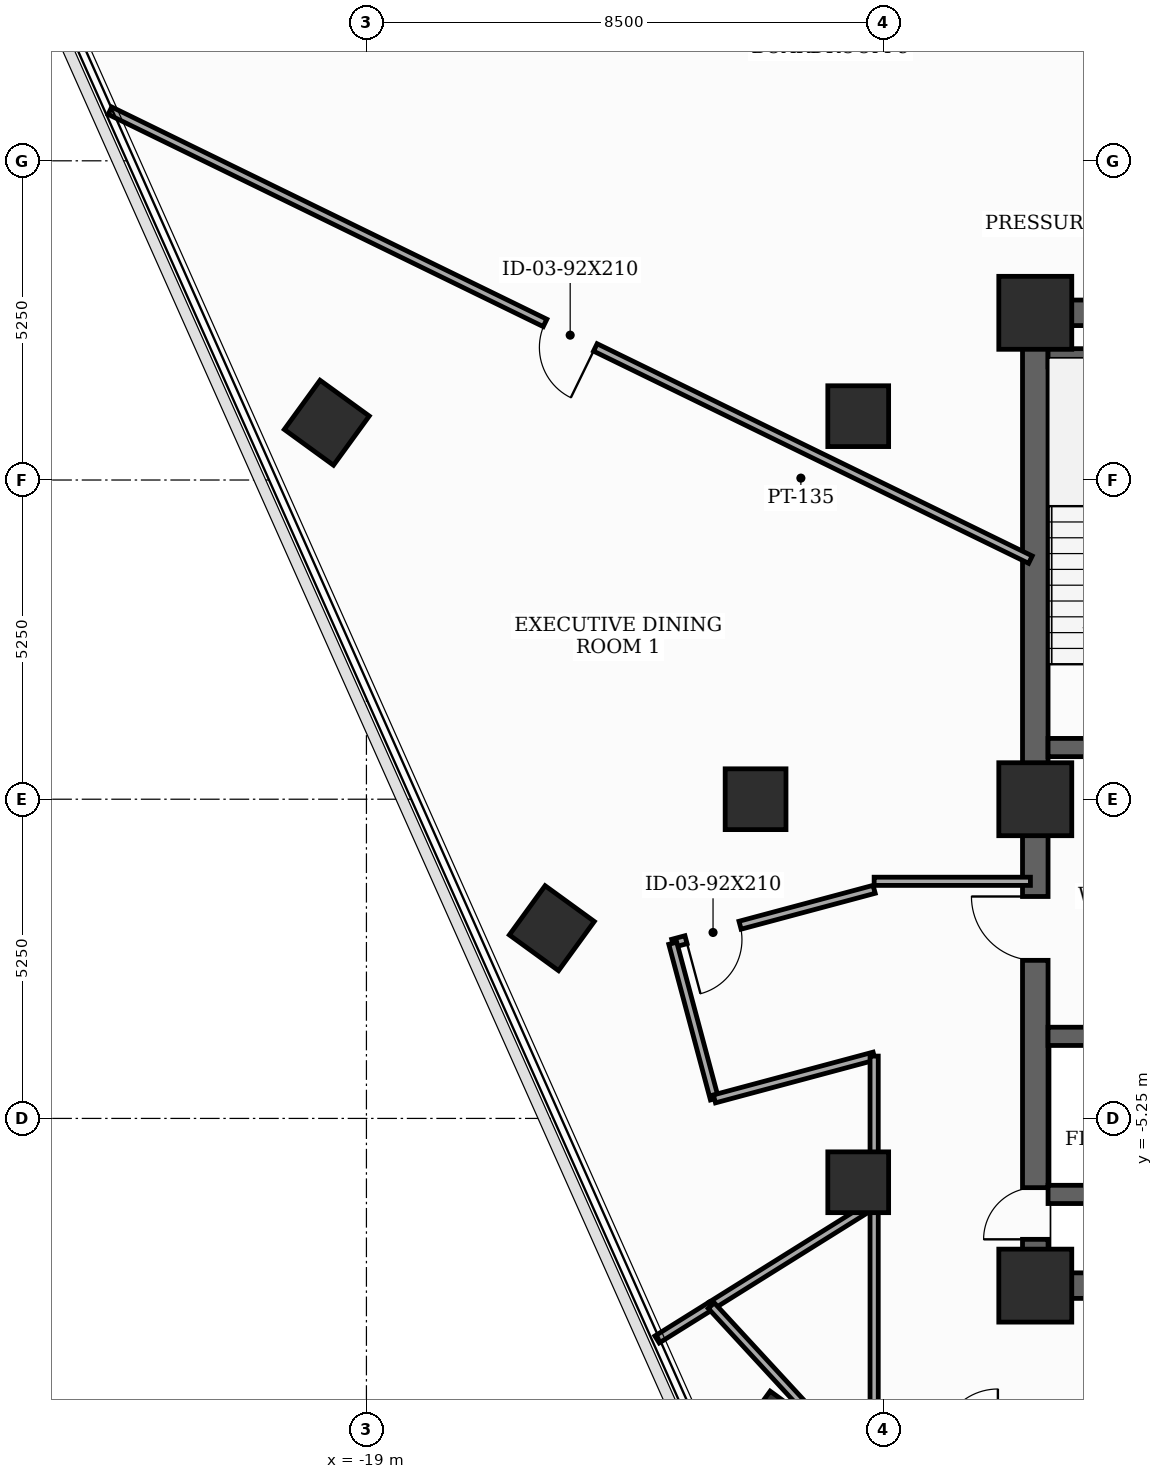
"""IFC4 building model, lengths in metres.
Left out: names, types, materials, properties, quantities, classifications, styles, units other than length and angle.
Written with IfcOpenShell. Run it as: python <this file> out.ifc"""

import sys

from ifc_helpers import new_model, si_unit, direction, frame, frame_2d, origin, origin_2d, place, context, subcontext, project, spatial, rectangle, extrude, element, fill, save


model = new_model("IFC4")
c1 = context("Model", 3, precision=1e-05, world=origin(), true_north=direction((0.0, 1.0)))
c2 = subcontext(c1, "Body", "Model", "MODEL_VIEW")
j1 = project(units=[si_unit("LENGTHUNIT", "METRE"), si_unit("PLANEANGLEUNIT", "RADIAN")], contexts=[c1])
p1 = place(None, origin())
s1 = spatial("IfcSite", under=j1, at=p1, CompositionType="ELEMENT")
p2 = place(p1, origin())
s2 = spatial("IfcBuilding", under=s1, at=p2, CompositionType="ELEMENT")
p3 = place(p2, frame((0.0, 0.0, 218.9)))
s3 = spatial("IfcBuildingStorey", under=s2, at=p3, CompositionType="ELEMENT", Elevation=218.9)
for number, where, z_axis, x_axis in (
    (1, (-8.0, -8.0, 0.0), (0.0, 0.0, 1.0), (1.0, 0.0, 0.0)),
    (2, (-8.0, 8.0, 0.0), (0.0, 0.0, 1.0), (1.0, 0.0, 0.0)),
    (3, (-8.0, 0.0, 0.0), (0.0, 0.0, 1.0), (1.0, 0.0, 0.0)),
):
    element("IfcColumn", number, at=place(p3, frame(where, z_axis=z_axis, x_axis=x_axis)), inside=s3, PredefinedType="COLUMN", context=c2, shape_type="SweptSolid", body=[
        extrude(rectangle(XDim=1.2, YDim=1.2, at=origin_2d()), origin(), (0.0, 0.0, 1.0), 3.7),
    ])
for number, where, z_axis, x_axis in (
    (4, (-10.912, 6.3, 0.0), (0.0, 0.0, 1.0), (1.0, 0.0, 0.0)),
    (5, (-12.6, 0.0, 0.0), (0.0, 0.0, 1.0), (1.0, 0.0, 0.0)),
    (6, (-10.912, -6.3, 0.0), (0.0, 0.0, 1.0), (1.0, 0.0, 0.0)),
    (7, (-19.652, 6.192, 0.0), (0.0, 0.0, 1.0), (0.588, 0.809, 0.0)),
    (8, (-15.951, -2.121, 0.0), (0.0, 0.0, 1.0), (0.588, 0.809, 0.0)),
    (9, (-12.25, -10.435, 0.0), (0.0, 0.0, 1.0), (0.588, 0.809, 0.0)),
):
    element("IfcColumn", number, at=place(p3, frame(where, z_axis=z_axis, x_axis=x_axis)), inside=s3, PredefinedType="COLUMN", context=c2, shape_type="SweptSolid", body=[
        extrude(rectangle(XDim=1.0, YDim=1.0, at=origin_2d()), origin(), (0.0, 0.0, 1.0), 3.7),
    ])
p4 = place(p3, frame((-8.0, -8.0, 0.0), z_axis=(0.0, 0.0, 1.0), x_axis=(0.0, 1.0, 0.0)))
e10 = element("IfcWall", 10, at=p4, inside=s3, PredefinedType="SHEAR", context=c2, shape_type="SweptSolid", body=[
    extrude(rectangle(XDim=16.0, YDim=0.42, at=frame_2d((8.0, 0.0))), origin(), (0.0, 0.0, 1.0), 3.5),
])
p5 = place(p4, frame((0.761, 0.0, 0.0)))
e11 = element("IfcOpeningElement", 11, at=p5, cuts=e10, PredefinedType="OPENING", context=c2, shape_type="SweptSolid", body=[
    extrude(rectangle(XDim=0.85, YDim=2.02, at=frame_2d((0.425, 1.01))), frame((0.0, 0.22, 0.0), z_axis=(0.0, -1.0, 0.0), x_axis=(1.0, 0.0, 0.0)), (0.0, 0.0, 1.0), 0.44),
])
p6 = place(p4, frame((5.35, 0.0, 0.0)))
e12 = element("IfcOpeningElement", 12, at=p6, cuts=e10, PredefinedType="OPENING", context=c2, shape_type="SweptSolid", body=[
    extrude(rectangle(XDim=1.05, YDim=2.15, at=frame_2d((0.525, 1.075))), frame((0.0, 0.22, 0.0), z_axis=(0.0, -1.0, 0.0), x_axis=(1.0, 0.0, 0.0)), (0.0, 0.0, 1.0), 0.44),
])
p7 = place(p3, frame((-8.0, -8.0, 0.0), z_axis=(0.0, 0.0, 1.0), x_axis=(1.0, 0.0, 0.0)))
e13 = element("IfcWall", 13, at=p7, inside=s3, PredefinedType="SHEAR", context=c2, shape_type="SweptSolid", body=[
    extrude(rectangle(XDim=16.0, YDim=0.42, at=frame_2d((8.0, 0.0))), origin(), (0.0, 0.0, 1.0), 3.5),
])
p8 = place(p7, frame((7.52, 0.0, 0.0)))
e14 = element("IfcOpeningElement", 14, at=p8, cuts=e13, PredefinedType="OPENING", context=c2, shape_type="SweptSolid", body=[
    extrude(rectangle(XDim=0.95, YDim=2.1, at=frame_2d((0.475, 1.05))), frame((0.0, 0.22, 0.0), z_axis=(0.0, -1.0, 0.0), x_axis=(1.0, 0.0, 0.0)), (0.0, 0.0, 1.0), 0.44),
])
p9 = place(p3, frame((-8.0, 8.0, 0.0), z_axis=(0.0, 0.0, 1.0), x_axis=(1.0, 0.0, 0.0)))
e15 = element("IfcWall", 15, at=p9, inside=s3, PredefinedType="SHEAR", context=c2, shape_type="SweptSolid", body=[
    extrude(rectangle(XDim=16.0, YDim=0.42, at=frame_2d((8.0, 0.0))), origin(), (0.0, 0.0, 1.0), 3.5),
])
p10 = place(p9, frame((7.1, 0.0, 0.0)))
e16 = element("IfcOpeningElement", 16, at=p10, cuts=e15, PredefinedType="OPENING", context=c2, shape_type="SweptSolid", body=[
    extrude(rectangle(XDim=1.8, YDim=2.15, at=frame_2d((0.9, 1.075))), frame((0.0, 0.22, 0.0), z_axis=(0.0, -1.0, 0.0), x_axis=(1.0, 0.0, 0.0)), (0.0, 0.0, 1.0), 0.44),
])
p11 = place(p3, frame((-7.79, 0.85, 0.0), z_axis=(0.0, 0.0, 1.0), x_axis=(1.0, 0.0, 0.0)))
e17 = element("IfcWall", 17, at=p11, inside=s3, PredefinedType="SHEAR", context=c2, shape_type="SweptSolid", body=[
    extrude(rectangle(XDim=3.34, YDim=0.3, at=frame_2d((1.67, 0.0))), origin(), (0.0, 0.0, 1.0), 3.5),
])
p12 = place(p11, frame((1.85, 0.0, 0.0)))
e18 = element("IfcOpeningElement", 18, at=p12, cuts=e17, PredefinedType="OPENING", context=c2, shape_type="SweptSolid", body=[
    extrude(rectangle(XDim=1.05, YDim=2.15, at=frame_2d((0.525, 1.075))), frame((0.0, 0.16, 0.0), z_axis=(0.0, -1.0, 0.0), x_axis=(1.0, 0.0, 0.0)), (0.0, 0.0, 1.0), 0.32),
])
p13 = place(p3, frame((-7.79, 7.26, 0.0), z_axis=(0.0, 0.0, 1.0), x_axis=(1.0, 0.0, 0.0)))
e19 = element("IfcWall", 19, at=p13, inside=s3, PredefinedType="SHEAR", context=c2, shape_type="SweptSolid", body=[
    extrude(rectangle(XDim=3.34, YDim=0.3, at=frame_2d((1.67, 0.0))), origin(), (0.0, 0.0, 1.0), 3.5),
])
p14 = place(p3, frame((-7.79, -3.9, 0.0), z_axis=(0.0, 0.0, 1.0), x_axis=(1.0, 0.0, 0.0)))
e20 = element("IfcWall", 20, at=p14, inside=s3, PredefinedType="SHEAR", context=c2, shape_type="SweptSolid", body=[
    extrude(rectangle(XDim=3.34, YDim=0.3, at=frame_2d((1.67, 0.0))), origin(), (0.0, 0.0, 1.0), 3.5),
])
p15 = place(p14, frame((1.27, 0.0, 0.0)))
e21 = element("IfcOpeningElement", 21, at=p15, cuts=e20, PredefinedType="OPENING", context=c2, shape_type="SweptSolid", body=[
    extrude(rectangle(XDim=1.1, YDim=2.1, at=frame_2d((0.55, 1.05))), frame((0.0, 0.16, 0.0), z_axis=(0.0, -1.0, 0.0), x_axis=(1.0, 0.0, 0.0)), (0.0, 0.0, 1.0), 0.32),
])
p16 = place(p3, frame((-7.79, -6.5, 0.0), z_axis=(0.0, 0.0, 1.0), x_axis=(1.0, 0.0, 0.0)))
e22 = element("IfcWall", 22, at=p16, inside=s3, PredefinedType="SHEAR", context=c2, shape_type="SweptSolid", body=[
    extrude(rectangle(XDim=3.34, YDim=0.3, at=frame_2d((1.67, 0.0))), origin(), (0.0, 0.0, 1.0), 3.5),
])
p17 = place(p3, frame((-8.08, -1.35, 0.0), z_axis=(0.0, 0.0, 1.0), x_axis=(-1.0, 0.0, 0.0)))
e23 = element("IfcWall", 23, at=p17, inside=s3, PredefinedType="PARTITIONING", context=c2, shape_type="SweptSolid", body=[
    extrude(rectangle(XDim=2.57, YDim=0.135, at=frame_2d((1.285, 0.0))), origin(), (0.0, 0.0, 1.0), 2.885),
])
p18 = place(p3, frame((-10.65, -1.482, 0.0), z_axis=(0.0, 0.0, 1.0), x_axis=(-0.965961397105, -0.2586862565, 0.0)))
e24 = element("IfcWall", 24, at=p18, inside=s3, PredefinedType="PARTITIONING", context=c2, shape_type="SweptSolid", body=[
    extrude(rectangle(XDim=3.429, YDim=0.135, at=frame_2d((1.714, 0.0))), origin(), (0.0, 0.0, 1.0), 2.885),
])
p19 = place(p18, frame((2.283, 0.0, 0.0)))
e25 = element("IfcOpeningElement", 25, at=p19, cuts=e24, PredefinedType="OPENING", context=c2, shape_type="SweptSolid", body=[
    extrude(rectangle(XDim=0.92, YDim=2.1, at=frame_2d((0.46, 1.05))), frame((0.0, 0.077, 0.0), z_axis=(0.0, -1.0, 0.0), x_axis=(1.0, 0.0, 0.0)), (0.0, 0.0, 1.0), 0.155),
])
p20 = place(p3, frame((-13.962, -2.369, 0.0), z_axis=(0.0, 0.0, 1.0), x_axis=(0.258413725385, -0.966034340245, 0.0)))
e26 = element("IfcWall", 26, at=p20, inside=s3, PredefinedType="PARTITIONING", context=c2, shape_type="SweptSolid", body=[
    extrude(rectangle(XDim=2.65, YDim=0.135, at=frame_2d((1.325, 0.0))), origin(), (0.0, 0.0, 1.0), 3.5),
])
p21 = place(p3, frame((-13.277, -4.929, 0.0), z_axis=(0.0, 0.0, 1.0), x_axis=(0.965934830229, 0.258785439601, 0.0)))
e27 = element("IfcWall", 27, at=p21, inside=s3, PredefinedType="PARTITIONING", context=c2, shape_type="SweptSolid", body=[
    extrude(rectangle(XDim=2.72, YDim=0.135, at=frame_2d((1.36, 0.0))), origin(), (0.0, 0.0, 1.0), 2.885),
])
p22 = place(p3, frame((-10.65, -4.225, 0.0), z_axis=(0.0, 0.0, 1.0), x_axis=(0.0, -1.0, 0.0)))
e28 = element("IfcWall", 28, at=p22, inside=s3, PredefinedType="PARTITIONING", context=c2, shape_type="SweptSolid", body=[
    extrude(rectangle(XDim=2.43, YDim=0.135, at=frame_2d((1.215, 0.0))), origin(), (0.0, 0.0, 1.0), 2.885),
])
p23 = place(p3, frame((-10.65, -6.655, 0.0), z_axis=(0.0, 0.0, 1.0), x_axis=(0.0, -1.0, 0.0)))
e29 = element("IfcWall", 29, at=p23, inside=s3, PredefinedType="PARTITIONING", context=c2, shape_type="SweptSolid", body=[
    extrude(rectangle(XDim=3.495, YDim=0.135, at=frame_2d((1.748, 0.0))), origin(), (0.0, 0.0, 1.0), 2.885),
])
p24 = place(p3, frame((-13.329, -8.329, 0.0), z_axis=(0.0, 0.0, 1.0), x_axis=(0.848059079617, 0.529901686617, 0.0)))
e30 = element("IfcWall", 30, at=p24, inside=s3, PredefinedType="PARTITIONING", context=c2, shape_type="SweptSolid", body=[
    extrude(rectangle(XDim=3.159, YDim=0.135, at=frame_2d((1.58, 0.0))), origin(), (0.0, 0.0, 1.0), 2.885),
])
p25 = place(p3, frame((-14.22, -8.885, 0.0), z_axis=(0.0, 0.0, 1.0), x_axis=(0.848337621773, 0.529455644493, 0.0)))
e31 = element("IfcWall", 31, at=p25, inside=s3, PredefinedType="PARTITIONING", context=c2, shape_type="SweptSolid", body=[
    extrude(rectangle(XDim=1.051, YDim=0.135, at=frame_2d((0.525, 0.0))), origin(), (0.0, 0.0, 1.0), 3.035),
])
p26 = place(p3, frame((-8.08, 3.941, 0.0), z_axis=(0.0, 0.0, 1.0), x_axis=(-0.898787530524, 0.438384505856, 0.0)))
e32 = element("IfcWall", 32, at=p26, inside=s3, PredefinedType="PARTITIONING", context=c2, shape_type="SweptSolid", body=[
    extrude(rectangle(XDim=16.843, YDim=0.135, at=frame_2d((8.421, 0.0))), origin(), (0.0, 0.0, 1.0), 2.885),
])
p27 = place(p26, frame((7.961, 0.0, 0.0)))
e33 = element("IfcOpeningElement", 33, at=p27, cuts=e32, PredefinedType="OPENING", context=c2, shape_type="SweptSolid", body=[
    extrude(rectangle(XDim=0.92, YDim=2.1, at=frame_2d((0.46, 1.05))), frame((0.0, 0.077, 0.0), z_axis=(0.0, -1.0, 0.0), x_axis=(1.0, 0.0, 0.0)), (0.0, 0.0, 1.0), 0.155),
])
p28 = place(p3, frame((-13.329, -8.329, 0.0), z_axis=(0.0, 0.0, 1.0), x_axis=(0.677841155448, -0.735208384052, 0.0)))
e34 = element("IfcWall", 34, at=p28, inside=s3, PredefinedType="PARTITIONING", context=c2, shape_type="SweptSolid", body=[
    extrude(rectangle(XDim=6.239, YDim=0.135, at=frame_2d((3.12, 0.0))), origin(), (0.0, 0.0, 1.0), 2.985),
])
p29 = place(p5, origin())
e35 = element("IfcDoor", 35, at=p29, inside=s3, OperationType="SINGLE_SWING_LEFT", PredefinedType="TRAPDOOR", context=c2, shape_type="SweptSolid", body=[
    extrude(rectangle(XDim=0.85, YDim=2.02, at=frame_2d((0.425, 1.01))), frame((0.0, 0.025, 0.0), z_axis=(0.0, -1.0, 0.0), x_axis=(1.0, 0.0, 0.0)), (0.0, 0.0, 1.0), 0.05),
])
fill(e11, e35)
p30 = place(p6, origin())
e36 = element("IfcDoor", 36, at=p30, inside=s3, OperationType="SINGLE_SWING_RIGHT", PredefinedType="DOOR", context=c2, shape_type="SweptSolid", body=[
    extrude(rectangle(XDim=1.05, YDim=2.15, at=frame_2d((0.525, 1.075))), frame((0.0, 0.025, 0.0), z_axis=(0.0, -1.0, 0.0), x_axis=(1.0, 0.0, 0.0)), (0.0, 0.0, 1.0), 0.05),
])
fill(e12, e36)
p31 = place(p19, origin())
e37 = element("IfcDoor", 37, at=p31, inside=s3, OperationType="SINGLE_SWING_RIGHT", PredefinedType="DOOR", context=c2, shape_type="SweptSolid", body=[
    extrude(rectangle(XDim=0.92, YDim=2.1, at=frame_2d((0.46, 1.05))), frame((0.0, 0.025, 0.0), z_axis=(0.0, -1.0, 0.0), x_axis=(1.0, 0.0, 0.0)), (0.0, 0.0, 1.0), 0.05),
])
fill(e25, e37)
p32 = place(p27, origin())
e38 = element("IfcDoor", 38, at=p32, inside=s3, OperationType="SINGLE_SWING_LEFT", PredefinedType="DOOR", context=c2, shape_type="SweptSolid", body=[
    extrude(rectangle(XDim=0.92, YDim=2.1, at=frame_2d((0.46, 1.05))), frame((0.0, 0.025, 0.0), z_axis=(0.0, -1.0, 0.0), x_axis=(1.0, 0.0, 0.0)), (0.0, 0.0, 1.0), 0.05),
])
fill(e33, e38)
save(model, sys.argv[1])
